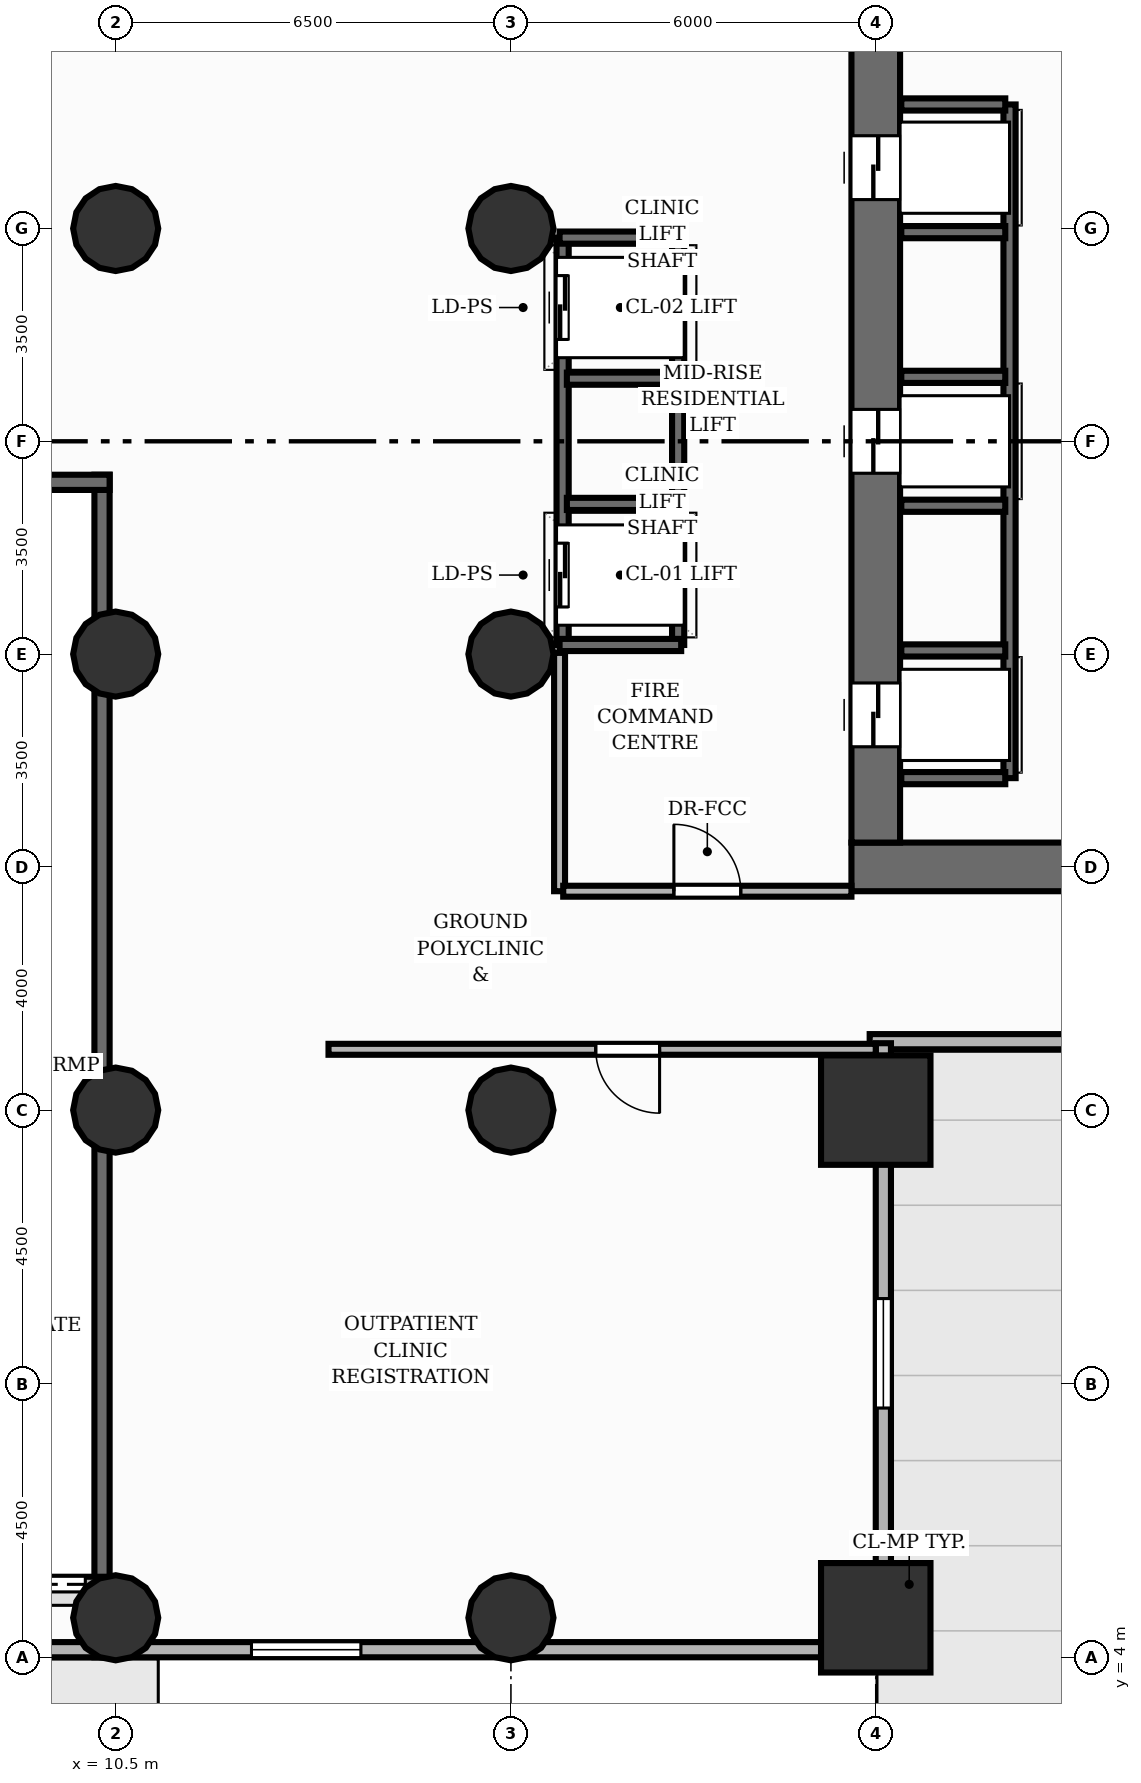
"""IFC4 building model, lengths in metres.
Left out: names, types, materials, properties, quantities, classifications, styles, units other than length and angle.
Written with IfcOpenShell. Run it as: python <this file> out.ifc"""

import sys

from ifc_helpers import new_model, si_unit, direction, frame, frame_2d, origin, origin_2d, place, context, subcontext, project, spatial, rectangle, circle, extrude, element, fill, save


model = new_model("IFC4")
c1 = context("Model", 3, precision=1e-05, world=origin(), true_north=direction((0.0, 1.0)))
c2 = subcontext(c1, "Body", "Model", "MODEL_VIEW")
j1 = project(units=[si_unit("LENGTHUNIT", "METRE"), si_unit("PLANEANGLEUNIT", "RADIAN")], contexts=[c1])
p1 = place(None, origin())
s1 = spatial("IfcSite", under=j1, at=p1, CompositionType="ELEMENT")
p2 = place(p1, origin())
s2 = spatial("IfcBuilding", under=s1, at=p2, CompositionType="ELEMENT")
p3 = place(p2, origin())
s3 = spatial("IfcBuildingStorey", under=s2, at=p3, CompositionType="ELEMENT", Elevation=0.0)
p4 = place(p3, frame((10.275, 4.0, 0.0), z_axis=(0.0, 0.0, 1.0), x_axis=(0.0, 1.0, 0.0)))
e1 = element("IfcWall", 1, at=p4, inside=s3, PredefinedType="SHEAR", context=c2, shape_type="SweptSolid", body=[
    extrude(rectangle(XDim=19.45, YDim=0.25, at=frame_2d((9.725, 0.0))), origin(), (0.0, 0.0, 1.0), 4.0),
])
p5 = place(p3, frame((4.15, 23.325, 0.0), z_axis=(0.0, 0.0, 1.0), x_axis=(1.0, 0.0, 0.0)))
e2 = element("IfcWall", 2, at=p5, inside=s3, PredefinedType="SHEAR", context=c2, shape_type="SweptSolid", body=[
    extrude(rectangle(XDim=6.25, YDim=0.25, at=frame_2d((3.125, 0.0))), origin(), (0.0, 0.0, 1.0), 4.0),
])
p6 = place(p3, frame((22.6, 17.0, 0.0), z_axis=(0.0, 0.0, 1.0), x_axis=(1.0, 0.0, 0.0)))
e3 = element("IfcWall", 3, at=p6, inside=s3, PredefinedType="SHEAR", context=c2, shape_type="SweptSolid", body=[
    extrude(rectangle(XDim=18.8, YDim=0.8, at=frame_2d((9.4, 0.0))), origin(), (0.0, 0.0, 1.0), 4.0),
])
p7 = place(p6, frame((5.9, 0.0, 0.0)))
e4 = element("IfcOpeningElement", 4, at=p7, cuts=e3, PredefinedType="OPENING", context=c2, shape_type="SweptSolid", body=[
    extrude(rectangle(XDim=1.1, YDim=2.15, at=frame_2d((0.55, 1.075))), frame((0.0, 0.41, 0.0), z_axis=(0.0, -1.0, 0.0), x_axis=(1.0, 0.0, 0.0)), (0.0, 0.0, 1.0), 0.82),
])
p8 = place(p6, frame((11.3, 0.0, 0.0)))
e5 = element("IfcOpeningElement", 5, at=p8, cuts=e3, PredefinedType="OPENING", context=c2, shape_type="SweptSolid", body=[
    extrude(rectangle(XDim=1.1, YDim=2.15, at=frame_2d((0.55, 1.075))), frame((0.0, 0.41, 0.0), z_axis=(0.0, -1.0, 0.0), x_axis=(1.0, 0.0, 0.0)), (0.0, 0.0, 1.0), 0.82),
])
p9 = place(p6, frame((13.1, 0.0, 0.0)))
e6 = element("IfcOpeningElement", 6, at=p9, cuts=e3, PredefinedType="OPENING", context=c2, shape_type="SweptSolid", body=[
    extrude(rectangle(XDim=1.1, YDim=2.15, at=frame_2d((0.55, 1.075))), frame((0.0, 0.41, 0.0), z_axis=(0.0, -1.0, 0.0), x_axis=(1.0, 0.0, 0.0)), (0.0, 0.0, 1.0), 0.82),
])
p10 = place(p6, frame((9.45, 0.0, 0.0)))
e7 = element("IfcOpeningElement", 7, at=p10, cuts=e3, PredefinedType="OPENING", context=c2, shape_type="SweptSolid", body=[
    extrude(rectangle(XDim=0.9, YDim=2.1, at=frame_2d((0.45, 1.05))), frame((0.0, 0.41, 0.0), z_axis=(0.0, -1.0, 0.0), x_axis=(1.0, 0.0, 0.0)), (0.0, 0.0, 1.0), 0.82),
])
p11 = place(p3, frame((23.0, 17.4, 0.0), z_axis=(0.0, 0.0, 1.0), x_axis=(0.0, 1.0, 0.0)))
e8 = element("IfcWall", 8, at=p11, inside=s3, PredefinedType="SHEAR", context=c2, shape_type="SweptSolid", body=[
    extrude(rectangle(XDim=13.2, YDim=0.8, at=frame_2d((6.6, 0.0))), origin(), (0.0, 0.0, 1.0), 4.0),
])
p12 = place(p11, frame((1.575, 0.0, 0.0)))
e9 = element("IfcOpeningElement", 9, at=p12, cuts=e8, PredefinedType="OPENING", context=c2, shape_type="SweptSolid", body=[
    extrude(rectangle(XDim=1.05, YDim=2.15, at=frame_2d((0.525, 1.075))), frame((0.0, 0.41, 0.0), z_axis=(0.0, -1.0, 0.0), x_axis=(1.0, 0.0, 0.0)), (0.0, 0.0, 1.0), 0.82),
])
p13 = place(p11, frame((6.075, 0.0, 0.0)))
e10 = element("IfcOpeningElement", 10, at=p13, cuts=e8, PredefinedType="OPENING", context=c2, shape_type="SweptSolid", body=[
    extrude(rectangle(XDim=1.05, YDim=2.15, at=frame_2d((0.525, 1.075))), frame((0.0, 0.41, 0.0), z_axis=(0.0, -1.0, 0.0), x_axis=(1.0, 0.0, 0.0)), (0.0, 0.0, 1.0), 0.82),
])
p14 = place(p11, frame((10.575, 0.0, 0.0)))
e11 = element("IfcOpeningElement", 11, at=p14, cuts=e8, PredefinedType="OPENING", context=c2, shape_type="SweptSolid", body=[
    extrude(rectangle(XDim=1.05, YDim=2.15, at=frame_2d((0.525, 1.075))), frame((0.0, 0.41, 0.0), z_axis=(0.0, -1.0, 0.0), x_axis=(1.0, 0.0, 0.0)), (0.0, 0.0, 1.0), 0.82),
])
for number, where, z_axis, x_axis in (
    (12, (10.5, 4.65, 0.0), (0.0, 0.0, 1.0), (1.0, 0.0, 0.0)),
    (13, (10.5, 13.0, 0.0), (0.0, 0.0, 1.0), (1.0, 0.0, 0.0)),
    (14, (10.5, 20.5, 0.0), (0.0, 0.0, 1.0), (1.0, 0.0, 0.0)),
    (15, (10.5, 27.5, 0.0), (0.0, 0.0, 1.0), (1.0, 0.0, 0.0)),
    (16, (17.0, 4.65, 0.0), (0.0, 0.0, 1.0), (1.0, 0.0, 0.0)),
    (17, (17.0, 13.0, 0.0), (0.0, 0.0, 1.0), (1.0, 0.0, 0.0)),
    (18, (17.0, 20.5, 0.0), (0.0, 0.0, 1.0), (1.0, 0.0, 0.0)),
    (19, (17.0, 27.5, 0.0), (0.0, 0.0, 1.0), (1.0, 0.0, 0.0)),
):
    element("IfcColumn", number, at=place(p3, frame(where, z_axis=z_axis, x_axis=x_axis)), inside=s3, PredefinedType="COLUMN", context=c2, shape_type="SweptSolid", body=[
        extrude(circle(Radius=0.7, at=origin_2d()), origin(), (0.0, 0.0, 1.0), 4.0),
    ])
for number, where, z_axis, x_axis in (
    (20, (23.0, 4.65, 0.0), (0.0, 0.0, 1.0), (1.0, 0.0, 0.0)),
    (21, (23.0, 13.0, 0.0), (0.0, 0.0, 1.0), (1.0, 0.0, 0.0)),
):
    element("IfcColumn", number, at=place(p3, frame(where, z_axis=z_axis, x_axis=x_axis)), inside=s3, PredefinedType="COLUMN", context=c2, shape_type="SweptSolid", body=[
        extrude(rectangle(XDim=1.8, YDim=1.8, at=origin_2d()), origin(), (0.0, 0.0, 1.0), 4.0),
    ])
p15 = place(p3, frame((41.1, 14.125, 0.0), z_axis=(0.0, 0.0, 1.0), x_axis=(-1.0, 0.0, 0.0)))
e22 = element("IfcWall", 22, at=p15, inside=s3, PredefinedType="SOLIDWALL", context=c2, shape_type="SweptSolid", body=[
    extrude(rectangle(XDim=18.2, YDim=0.25, at=frame_2d((9.1, 0.0))), origin(), (0.0, 0.0, 1.0), 3.72),
])
p16 = place(p15, frame((11.15, 0.0, 0.0)))
e23 = element("IfcOpeningElement", 23, at=p16, cuts=e22, PredefinedType="OPENING", context=c2, shape_type="SweptSolid", body=[
    extrude(rectangle(XDim=1.8, YDim=2.3, at=frame_2d((0.9, 1.15))), frame((0.0, 0.135, 0.0), z_axis=(0.0, -1.0, 0.0), x_axis=(1.0, 0.0, 0.0)), (0.0, 0.0, 1.0), 0.27),
])
p17 = place(p15, frame((2.6, 0.0, 0.0)))
e24 = element("IfcOpeningElement", 24, at=p17, cuts=e22, PredefinedType="OPENING", context=c2, shape_type="SweptSolid", body=[
    extrude(rectangle(XDim=1.8, YDim=2.3, at=frame_2d((0.9, 1.15))), frame((0.0, 0.135, 0.0), z_axis=(0.0, -1.0, 0.0), x_axis=(1.0, 0.0, 0.0)), (0.0, 0.0, 1.0), 0.27),
])
p18 = place(p15, frame((6.2, 0.0, 0.0)))
e25 = element("IfcOpeningElement", 25, at=p18, cuts=e22, PredefinedType="OPENING", context=c2, shape_type="SweptSolid", body=[
    extrude(rectangle(XDim=1.8, YDim=2.3, at=frame_2d((0.9, 1.15))), frame((0.0, 0.135, 0.0), z_axis=(0.0, -1.0, 0.0), x_axis=(1.0, 0.0, 0.0)), (0.0, 0.0, 1.0), 0.27),
])
p19 = place(p3, frame((23.125, 3.9, 0.0), z_axis=(0.0, 0.0, 1.0), x_axis=(0.0, 1.0, 0.0)))
e26 = element("IfcWall", 26, at=p19, inside=s3, PredefinedType="SOLIDWALL", context=c2, shape_type="SweptSolid", body=[
    extrude(rectangle(XDim=10.2, YDim=0.25, at=frame_2d((5.1, 0.0))), origin(), (0.0, 0.0, 1.0), 3.178),
])
p20 = place(p19, frame((4.2, 0.0, 0.9)))
e27 = element("IfcOpeningElement", 27, at=p20, cuts=e26, PredefinedType="OPENING", context=c2, shape_type="SweptSolid", body=[
    extrude(rectangle(XDim=1.8, YDim=1.8, at=frame_2d((0.9, 0.9))), frame((0.0, 0.135, 0.0), z_axis=(0.0, -1.0, 0.0), x_axis=(1.0, 0.0, 0.0)), (0.0, 0.0, 1.0), 0.27),
])
p21 = place(p3, frame((23.1, 4.125, 0.0), z_axis=(0.0, 0.0, 1.0), x_axis=(-1.0, 0.0, 0.0)))
e28 = element("IfcWall", 28, at=p21, inside=s3, PredefinedType="SOLIDWALL", context=c2, shape_type="SweptSolid", body=[
    extrude(rectangle(XDim=14.2, YDim=0.25, at=frame_2d((7.1, 0.0))), origin(), (0.0, 0.0, 1.0), 3.72),
])
p22 = place(p21, frame((8.567, 0.0, 0.9)))
e29 = element("IfcOpeningElement", 29, at=p22, cuts=e28, PredefinedType="OPENING", context=c2, shape_type="SweptSolid", body=[
    extrude(rectangle(XDim=1.8, YDim=1.8, at=frame_2d((0.9, 0.9))), frame((0.0, 0.135, 0.0), z_axis=(0.0, -1.0, 0.0), x_axis=(1.0, 0.0, 0.0)), (0.0, 0.0, 1.0), 0.27),
])
p23 = place(p3, frame((10.45, 5.2, 0.0), z_axis=(0.0, 0.0, 1.0), x_axis=(-1.0, 0.0, 0.0)))
e30 = element("IfcWall", 30, at=p23, inside=s3, PredefinedType="SOLIDWALL", context=c2, shape_type="SweptSolid", body=[
    extrude(rectangle(XDim=6.3, YDim=0.25, at=frame_2d((3.15, 0.0))), origin(), (0.0, 0.0, 1.0), 3.55),
])
p24 = place(p23, frame((0.45, 0.0, 0.0)))
e31 = element("IfcOpeningElement", 31, at=p24, cuts=e30, PredefinedType="OPENING", context=c2, shape_type="SweptSolid", body=[
    extrude(rectangle(XDim=5.4, YDim=2.6, at=frame_2d((2.7, 1.3))), frame((0.0, 0.135, 0.0), z_axis=(0.0, -1.0, 0.0), x_axis=(1.0, 0.0, 0.0)), (0.0, 0.0, 1.0), 0.27),
])
p25 = place(p3, frame((25.2, 18.46, 0.0), z_axis=(0.0, 0.0, 1.0), x_axis=(0.0, 1.0, 0.0)))
e32 = element("IfcWall", 32, at=p25, inside=s3, PredefinedType="SHEAR", context=c2, shape_type="SweptSolid", body=[
    extrude(rectangle(XDim=11.08, YDim=0.2, at=frame_2d((5.54, 0.0))), origin(), (0.0, 0.0, 1.0), 4.0),
])
for number, where, z_axis, x_axis in (
    (33, (23.42, 18.46, 0.0), (0.0, 0.0, 1.0), (1.0, 0.0, 0.0)),
    (34, (23.42, 29.54, 0.0), (0.0, 0.0, 1.0), (1.0, 0.0, 0.0)),
    (35, (23.42, 20.56, 0.0), (0.0, 0.0, 1.0), (1.0, 0.0, 0.0)),
    (36, (23.42, 22.94, 0.0), (0.0, 0.0, 1.0), (1.0, 0.0, 0.0)),
    (37, (23.42, 25.06, 0.0), (0.0, 0.0, 1.0), (1.0, 0.0, 0.0)),
    (38, (23.42, 27.44, 0.0), (0.0, 0.0, 1.0), (1.0, 0.0, 0.0)),
):
    element("IfcWall", number, at=place(p3, frame(where, z_axis=z_axis, x_axis=x_axis)), inside=s3, PredefinedType="SHEAR", context=c2, shape_type="SweptSolid", body=[
        extrude(rectangle(XDim=1.71, YDim=0.2, at=frame_2d((0.855, 0.0))), origin(), (0.0, 0.0, 1.0), 4.0),
    ])
p26 = place(p3, frame((17.85, 20.65, 0.0), z_axis=(0.0, 0.0, 1.0), x_axis=(0.0, 1.0, 0.0)))
e39 = element("IfcWall", 39, at=p26, inside=s3, PredefinedType="SHEAR", context=c2, shape_type="SweptSolid", body=[
    extrude(rectangle(XDim=6.7, YDim=0.2, at=frame_2d((3.35, 0.0))), origin(), (0.0, 0.0, 1.0), 4.0),
])
p27 = place(p26, frame((0.625, 0.0, 0.0)))
e40 = element("IfcOpeningElement", 40, at=p27, cuts=e39, PredefinedType="OPENING", context=c2, shape_type="SweptSolid", body=[
    extrude(rectangle(XDim=1.05, YDim=2.15, at=frame_2d((0.525, 1.075))), frame((0.0, 0.11, 0.0), z_axis=(0.0, -1.0, 0.0), x_axis=(1.0, 0.0, 0.0)), (0.0, 0.0, 1.0), 0.22),
])
p28 = place(p26, frame((5.025, 0.0, 0.0)))
e41 = element("IfcOpeningElement", 41, at=p28, cuts=e39, PredefinedType="OPENING", context=c2, shape_type="SweptSolid", body=[
    extrude(rectangle(XDim=1.05, YDim=2.15, at=frame_2d((0.525, 1.075))), frame((0.0, 0.11, 0.0), z_axis=(0.0, -1.0, 0.0), x_axis=(1.0, 0.0, 0.0)), (0.0, 0.0, 1.0), 0.22),
])
p29 = place(p3, frame((19.75, 20.65, 0.0), z_axis=(0.0, 0.0, 1.0), x_axis=(0.0, 1.0, 0.0)))
e42 = element("IfcWall", 42, at=p29, inside=s3, PredefinedType="SHEAR", context=c2, shape_type="SweptSolid", body=[
    extrude(rectangle(XDim=6.7, YDim=0.2, at=frame_2d((3.35, 0.0))), origin(), (0.0, 0.0, 1.0), 4.0),
])
for number, where, z_axis, x_axis in (
    (43, (17.8, 20.65, 0.0), (0.0, 0.0, 1.0), (1.0, 0.0, 0.0)),
    (44, (17.8, 27.35, 0.0), (0.0, 0.0, 1.0), (1.0, 0.0, 0.0)),
):
    element("IfcWall", number, at=place(p3, frame(where, z_axis=z_axis, x_axis=x_axis)), inside=s3, PredefinedType="SHEAR", context=c2, shape_type="SweptSolid", body=[
        extrude(rectangle(XDim=2.0, YDim=0.2, at=frame_2d((1.0, 0.0))), origin(), (0.0, 0.0, 1.0), 4.0),
    ])
for number, where, z_axis, x_axis in (
    (45, (17.92, 22.97, 0.0), (0.0, 0.0, 1.0), (1.0, 0.0, 0.0)),
    (46, (17.92, 25.03, 0.0), (0.0, 0.0, 1.0), (1.0, 0.0, 0.0)),
):
    element("IfcWall", number, at=place(p3, frame(where, z_axis=z_axis, x_axis=x_axis)), inside=s3, PredefinedType="SHEAR", context=c2, shape_type="SweptSolid", body=[
        extrude(rectangle(XDim=1.76, YDim=0.2, at=frame_2d((0.88, 0.0))), origin(), (0.0, 0.0, 1.0), 4.0),
    ])
p30 = place(p3, frame((17.8, 20.52, 0.0), z_axis=(0.0, 0.0, 1.0), x_axis=(0.0, -1.0, 0.0)))
e47 = element("IfcWall", 47, at=p30, inside=s3, PredefinedType="PARTITIONING", context=c2, shape_type="SweptSolid", body=[
    extrude(rectangle(XDim=3.92, YDim=0.18, at=frame_2d((1.96, 0.0))), origin(), (0.0, 0.0, 1.0), 3.715),
])
p31 = place(p3, frame((17.86, 16.6, 0.0), z_axis=(0.0, 0.0, 1.0), x_axis=(1.0, 0.0, 0.0)))
e48 = element("IfcWall", 48, at=p31, inside=s3, PredefinedType="PARTITIONING", context=c2, shape_type="SweptSolid", body=[
    extrude(rectangle(XDim=4.74, YDim=0.18, at=frame_2d((2.37, 0.0))), origin(), (0.0, 0.0, 1.0), 3.715),
])
p32 = place(p31, frame((1.82, 0.0, 0.0)))
e49 = element("IfcOpeningElement", 49, at=p32, cuts=e48, PredefinedType="OPENING", context=c2, shape_type="SweptSolid", body=[
    extrude(rectangle(XDim=1.1, YDim=2.15, at=frame_2d((0.55, 1.075))), frame((0.0, 0.1, 0.0), z_axis=(0.0, -1.0, 0.0), x_axis=(1.0, 0.0, 0.0)), (0.0, 0.0, 1.0), 0.2),
])
p33 = place(p3, frame((23.0, 14.0, 0.0), z_axis=(0.0, 0.0, 1.0), x_axis=(-1.0, 0.0, 0.0)))
e50 = element("IfcWall", 50, at=p33, inside=s3, PredefinedType="PARTITIONING", context=c2, shape_type="SweptSolid", body=[
    extrude(rectangle(XDim=9.0, YDim=0.18, at=frame_2d((4.5, 0.0))), origin(), (0.0, 0.0, 1.0), 3.715),
])
p34 = place(p33, frame((3.555, 0.0, 0.0)))
e51 = element("IfcOpeningElement", 51, at=p34, cuts=e50, PredefinedType="OPENING", context=c2, shape_type="SweptSolid", body=[
    extrude(rectangle(XDim=1.05, YDim=2.15, at=frame_2d((0.525, 1.075))), frame((0.0, 0.1, 0.0), z_axis=(0.0, -1.0, 0.0), x_axis=(1.0, 0.0, 0.0)), (0.0, 0.0, 1.0), 0.2),
])
p35 = place(p20, origin())
e52 = element("IfcWindow", 52, at=p35, inside=s3, PartitioningType="SINGLE_PANEL", PredefinedType="WINDOW", context=c2, shape_type="SweptSolid", body=[
    extrude(rectangle(XDim=1.8, YDim=1.8, at=frame_2d((0.9, 0.9))), frame((0.0, 0.03, 0.0), z_axis=(0.0, -1.0, 0.0), x_axis=(1.0, 0.0, 0.0)), (0.0, 0.0, 1.0), 0.06),
])
fill(e27, e52)
p36 = place(p22, origin())
e53 = element("IfcWindow", 53, at=p36, inside=s3, PartitioningType="SINGLE_PANEL", PredefinedType="WINDOW", context=c2, shape_type="SweptSolid", body=[
    extrude(rectangle(XDim=1.8, YDim=1.8, at=frame_2d((0.9, 0.9))), frame((0.0, 0.03, 0.0), z_axis=(0.0, -1.0, 0.0), x_axis=(1.0, 0.0, 0.0)), (0.0, 0.0, 1.0), 0.06),
])
fill(e29, e53)
p37 = place(p24, origin())
e54 = element("IfcDoor", 54, at=p37, inside=s3, OperationType="ROLLINGUP", PredefinedType="GATE", context=c2, shape_type="SweptSolid", body=[
    extrude(rectangle(XDim=5.4, YDim=2.6, at=frame_2d((2.7, 1.3))), frame((0.0, 0.025, 0.0), z_axis=(0.0, -1.0, 0.0), x_axis=(1.0, 0.0, 0.0)), (0.0, 0.0, 1.0), 0.05),
])
fill(e31, e54)
p38 = place(p12, origin())
e55 = element("IfcDoor", 55, at=p38, inside=s3, OperationType="DOUBLE_DOOR_SLIDING", PredefinedType="DOOR", context=c2, shape_type="SweptSolid", body=[
    extrude(rectangle(XDim=1.05, YDim=2.15, at=frame_2d((0.525, 1.075))), frame((0.0, 0.025, 0.0), z_axis=(0.0, -1.0, 0.0), x_axis=(1.0, 0.0, 0.0)), (0.0, 0.0, 1.0), 0.05),
])
fill(e9, e55)
p39 = place(p13, origin())
e56 = element("IfcDoor", 56, at=p39, inside=s3, OperationType="DOUBLE_DOOR_SLIDING", PredefinedType="DOOR", context=c2, shape_type="SweptSolid", body=[
    extrude(rectangle(XDim=1.05, YDim=2.15, at=frame_2d((0.525, 1.075))), frame((0.0, 0.025, 0.0), z_axis=(0.0, -1.0, 0.0), x_axis=(1.0, 0.0, 0.0)), (0.0, 0.0, 1.0), 0.05),
])
fill(e10, e56)
p40 = place(p14, origin())
e57 = element("IfcDoor", 57, at=p40, inside=s3, OperationType="DOUBLE_DOOR_SLIDING", PredefinedType="DOOR", context=c2, shape_type="SweptSolid", body=[
    extrude(rectangle(XDim=1.05, YDim=2.15, at=frame_2d((0.525, 1.075))), frame((0.0, 0.025, 0.0), z_axis=(0.0, -1.0, 0.0), x_axis=(1.0, 0.0, 0.0)), (0.0, 0.0, 1.0), 0.05),
])
fill(e11, e57)
p41 = place(p27, origin())
e58 = element("IfcDoor", 58, at=p41, inside=s3, OperationType="DOUBLE_DOOR_SLIDING", PredefinedType="DOOR", context=c2, shape_type="SweptSolid", body=[
    extrude(rectangle(XDim=1.05, YDim=2.15, at=frame_2d((0.525, 1.075))), frame((0.0, 0.025, 0.0), z_axis=(0.0, -1.0, 0.0), x_axis=(1.0, 0.0, 0.0)), (0.0, 0.0, 1.0), 0.05),
])
fill(e40, e58)
p42 = place(p28, origin())
e59 = element("IfcDoor", 59, at=p42, inside=s3, OperationType="DOUBLE_DOOR_SLIDING", PredefinedType="DOOR", context=c2, shape_type="SweptSolid", body=[
    extrude(rectangle(XDim=1.05, YDim=2.15, at=frame_2d((0.525, 1.075))), frame((0.0, 0.025, 0.0), z_axis=(0.0, -1.0, 0.0), x_axis=(1.0, 0.0, 0.0)), (0.0, 0.0, 1.0), 0.05),
])
fill(e41, e59)
p43 = place(p32, origin())
e60 = element("IfcDoor", 60, at=p43, inside=s3, OperationType="SINGLE_SWING_LEFT", PredefinedType="DOOR", context=c2, shape_type="SweptSolid", body=[
    extrude(rectangle(XDim=1.1, YDim=2.15, at=frame_2d((0.55, 1.075))), frame((0.0, 0.025, 0.0), z_axis=(0.0, -1.0, 0.0), x_axis=(1.0, 0.0, 0.0)), (0.0, 0.0, 1.0), 0.05),
])
fill(e49, e60)
p44 = place(p34, origin())
e61 = element("IfcDoor", 61, at=p44, inside=s3, OperationType="SINGLE_SWING_LEFT", PredefinedType="DOOR", context=c2, shape_type="SweptSolid", body=[
    extrude(rectangle(XDim=1.05, YDim=2.15, at=frame_2d((0.525, 1.075))), frame((0.0, 0.025, 0.0), z_axis=(0.0, -1.0, 0.0), x_axis=(1.0, 0.0, 0.0)), (0.0, 0.0, 1.0), 0.05),
])
fill(e51, e61)
save(model, sys.argv[1])
